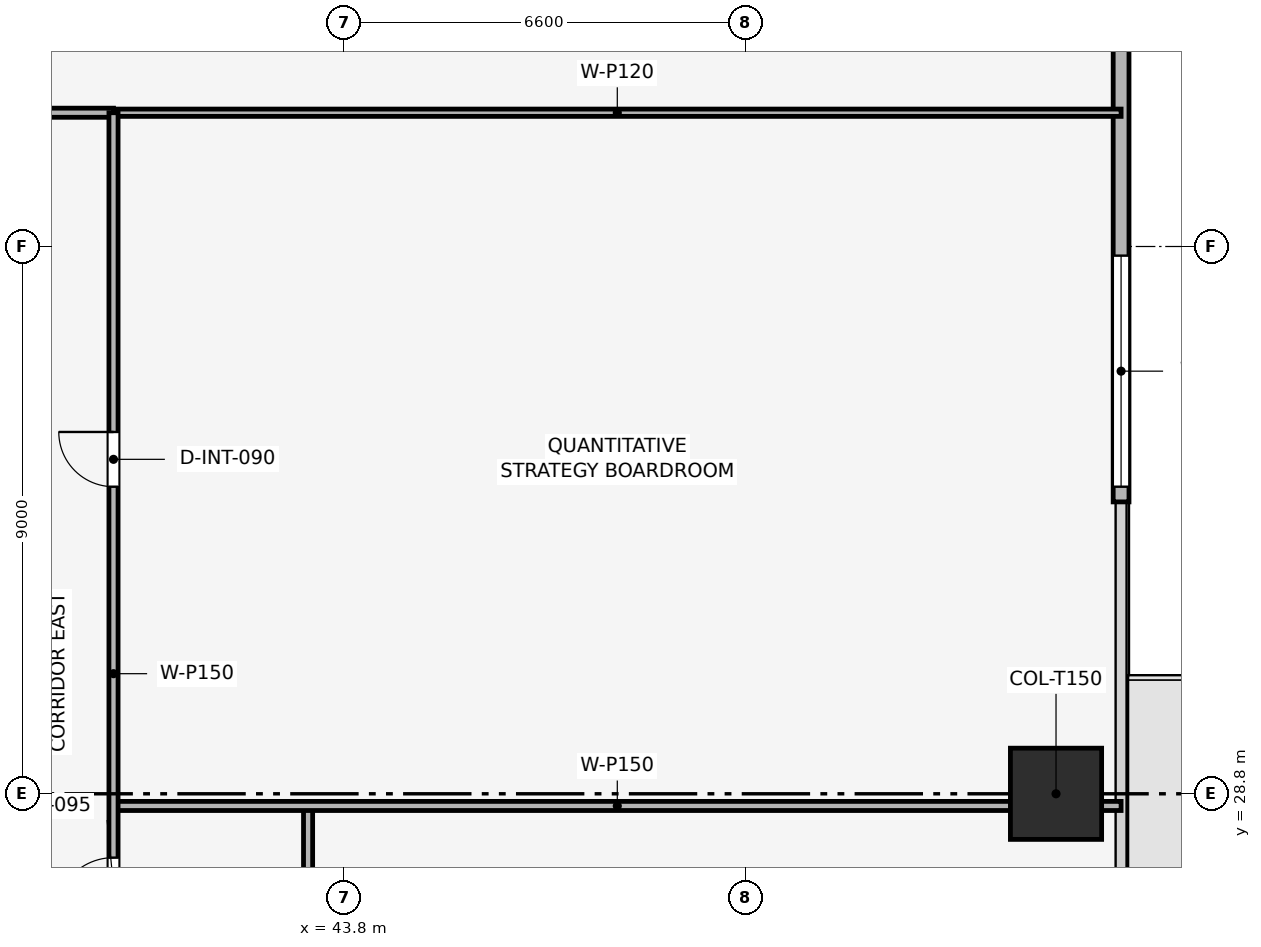
"""IFC4 building model, lengths in metres.
Left out: names, types, materials, properties, quantities, classifications, styles, units other than length and angle.
Written with IfcOpenShell. Run it as: python <this file> out.ifc"""

import sys

from ifc_helpers import new_model, si_unit, direction, frame, frame_2d, origin, origin_2d, place, context, subcontext, project, spatial, rectangle, extrude, element, fill, save


model = new_model("IFC4")
c1 = context("Model", 3, precision=1e-05, world=origin(), true_north=direction((0.0, 1.0)))
c2 = subcontext(c1, "Body", "Model", "MODEL_VIEW")
j1 = project(units=[si_unit("LENGTHUNIT", "METRE"), si_unit("PLANEANGLEUNIT", "RADIAN")], contexts=[c1])
p1 = place(None, origin())
s1 = spatial("IfcSite", under=j1, at=p1, CompositionType="ELEMENT")
p2 = place(p1, origin())
s2 = spatial("IfcBuilding", under=s1, at=p2, CompositionType="ELEMENT")
p3 = place(p2, frame((0.0, 0.0, 88.5)))
s3 = spatial("IfcBuildingStorey", under=s2, at=p3, CompositionType="ELEMENT", Elevation=88.5)
p4 = place(p3, frame((55.5, 28.8, 0.003), z_axis=(0.0, 0.0, 1.0), x_axis=(1.0, 0.0, 0.0)))
e1 = element("IfcColumn", 1, at=p4, inside=s3, PredefinedType="COLUMN", context=c2, shape_type="SweptSolid", body=[
    extrude(rectangle(XDim=1.5, YDim=1.5, at=origin_2d()), origin(), (0.0, 0.0, 1.0), 3.644),
])
p5 = place(p3, frame((56.57, 48.9, 0.0), z_axis=(0.0, 0.0, 1.0), x_axis=(0.0, -1.0, 0.0)))
e2 = element("IfcWall", 2, at=p5, inside=s3, PredefinedType="SOLIDWALL", context=c2, shape_type="SweptSolid", body=[
    extrude(rectangle(XDim=15.3, YDim=0.26, at=frame_2d((7.65, 0.0))), origin(), (0.0, 0.0, 1.0), 3.65),
])
p6 = place(p5, frame((11.25, 0.0, 0.9)))
e3 = element("IfcOpeningElement", 3, at=p6, cuts=e2, PredefinedType="OPENING", context=c2, shape_type="SweptSolid", body=[
    extrude(rectangle(XDim=3.8, YDim=1.9, at=frame_2d((1.9, 0.95))), frame((0.0, 0.14, 0.0), z_axis=(0.0, -1.0, 0.0), x_axis=(1.0, 0.0, 0.0)), (0.0, 0.0, 1.0), 0.28),
])
p7 = place(p3, frame((40.0, 40.0, 0.0), z_axis=(0.0, 0.0, 1.0), x_axis=(1.0, 0.0, 0.0)))
e4 = element("IfcWall", 4, at=p7, inside=s3, PredefinedType="PARTITIONING", context=c2, shape_type="SweptSolid", body=[
    extrude(rectangle(XDim=16.57, YDim=0.12, at=frame_2d((8.285, 0.0))), origin(), (0.0, 0.0, 1.0), 2.935),
])
p8 = place(p3, frame((43.2, 20.2, 0.0), z_axis=(0.0, 0.0, 1.0), x_axis=(0.0, 1.0, 0.0)))
e5 = element("IfcWall", 5, at=p8, inside=s3, PredefinedType="PARTITIONING", context=c2, shape_type="SweptSolid", body=[
    extrude(rectangle(XDim=8.4, YDim=0.15, at=frame_2d((4.2, 0.0))), origin(), (0.0, 0.0, 1.0), 3.085),
])
p9 = place(p3, frame((40.0, 28.6, 0.0), z_axis=(0.0, 0.0, 1.0), x_axis=(1.0, 0.0, 0.0)))
e6 = element("IfcWall", 6, at=p9, inside=s3, PredefinedType="PARTITIONING", context=c2, shape_type="SweptSolid", body=[
    extrude(rectangle(XDim=16.57, YDim=0.15, at=frame_2d((8.285, 0.0))), origin(), (0.0, 0.0, 1.0), 2.935),
])
p10 = place(p3, frame((17.6, 40.0, 0.0), z_axis=(0.0, 0.0, 1.0), x_axis=(1.0, 0.0, 0.0)))
e7 = element("IfcWall", 7, at=p10, inside=s3, PredefinedType="PARTITIONING", context=c2, shape_type="SweptSolid", body=[
    extrude(rectangle(XDim=22.4, YDim=0.15, at=frame_2d((11.2, 0.0))), origin(), (0.0, 0.0, 1.0), 3.085),
])
p11 = place(p10, frame((0.7, 0.0, 0.0)))
e8 = element("IfcOpeningElement", 8, at=p11, cuts=e7, PredefinedType="OPENING", context=c2, shape_type="SweptSolid", body=[
    extrude(rectangle(XDim=0.9, YDim=2.1, at=frame_2d((0.45, 1.05))), frame((0.0, 0.085, 0.0), z_axis=(0.0, -1.0, 0.0), x_axis=(1.0, 0.0, 0.0)), (0.0, 0.0, 1.0), 0.17),
])
p12 = place(p10, frame((4.888, 0.0, 0.0)))
e9 = element("IfcOpeningElement", 9, at=p12, cuts=e7, PredefinedType="OPENING", context=c2, shape_type="SweptSolid", body=[
    extrude(rectangle(XDim=0.9, YDim=2.1, at=frame_2d((0.45, 1.05))), frame((0.0, 0.085, 0.0), z_axis=(0.0, -1.0, 0.0), x_axis=(1.0, 0.0, 0.0)), (0.0, 0.0, 1.0), 0.17),
])
p13 = place(p10, frame((10.808, 0.0, 0.0)))
e10 = element("IfcOpeningElement", 10, at=p13, cuts=e7, PredefinedType="OPENING", context=c2, shape_type="SweptSolid", body=[
    extrude(rectangle(XDim=0.9, YDim=2.1, at=frame_2d((0.45, 1.05))), frame((0.0, 0.085, 0.0), z_axis=(0.0, -1.0, 0.0), x_axis=(1.0, 0.0, 0.0)), (0.0, 0.0, 1.0), 0.17),
])
p14 = place(p10, frame((17.82, 0.0, 0.0)))
e11 = element("IfcOpeningElement", 11, at=p14, cuts=e7, PredefinedType="OPENING", context=c2, shape_type="SweptSolid", body=[
    extrude(rectangle(XDim=0.9, YDim=2.1, at=frame_2d((0.45, 1.05))), frame((0.0, 0.085, 0.0), z_axis=(0.0, -1.0, 0.0), x_axis=(1.0, 0.0, 0.0)), (0.0, 0.0, 1.0), 0.17),
])
p15 = place(p3, frame((40.0, 17.6, 0.0), z_axis=(0.0, 0.0, 1.0), x_axis=(0.0, 1.0, 0.0)))
e12 = element("IfcWall", 12, at=p15, inside=s3, PredefinedType="PARTITIONING", context=c2, shape_type="SweptSolid", body=[
    extrude(rectangle(XDim=22.4, YDim=0.15, at=frame_2d((11.2, 0.0))), origin(), (0.0, 0.0, 1.0), 3.085),
])
p16 = place(p15, frame((0.85, 0.0, 0.0)))
e13 = element("IfcOpeningElement", 13, at=p16, cuts=e12, PredefinedType="OPENING", context=c2, shape_type="SweptSolid", body=[
    extrude(rectangle(XDim=0.9, YDim=2.1, at=frame_2d((0.45, 1.05))), frame((0.0, 0.085, 0.0), z_axis=(0.0, -1.0, 0.0), x_axis=(1.0, 0.0, 0.0)), (0.0, 0.0, 1.0), 0.17),
])
p17 = place(p15, frame((3.55, 0.0, 0.0)))
e14 = element("IfcOpeningElement", 14, at=p17, cuts=e12, PredefinedType="OPENING", context=c2, shape_type="SweptSolid", body=[
    extrude(rectangle(XDim=0.9, YDim=2.1, at=frame_2d((0.45, 1.05))), frame((0.0, 0.085, 0.0), z_axis=(0.0, -1.0, 0.0), x_axis=(1.0, 0.0, 0.0)), (0.0, 0.0, 1.0), 0.17),
])
p18 = place(p15, frame((6.45, 0.0, 0.0)))
e15 = element("IfcOpeningElement", 15, at=p18, cuts=e12, PredefinedType="OPENING", context=c2, shape_type="SweptSolid", body=[
    extrude(rectangle(XDim=0.9, YDim=2.1, at=frame_2d((0.45, 1.05))), frame((0.0, 0.085, 0.0), z_axis=(0.0, -1.0, 0.0), x_axis=(1.0, 0.0, 0.0)), (0.0, 0.0, 1.0), 0.17),
])
p19 = place(p15, frame((9.2, 0.0, 0.0)))
e16 = element("IfcOpeningElement", 16, at=p19, cuts=e12, PredefinedType="OPENING", context=c2, shape_type="SweptSolid", body=[
    extrude(rectangle(XDim=0.95, YDim=2.1, at=frame_2d((0.475, 1.05))), frame((0.0, 0.085, 0.0), z_axis=(0.0, -1.0, 0.0), x_axis=(1.0, 0.0, 0.0)), (0.0, 0.0, 1.0), 0.17),
])
p20 = place(p15, frame((16.25, 0.0, 0.0)))
e17 = element("IfcOpeningElement", 17, at=p20, cuts=e12, PredefinedType="OPENING", context=c2, shape_type="SweptSolid", body=[
    extrude(rectangle(XDim=0.9, YDim=2.1, at=frame_2d((0.45, 1.05))), frame((0.0, 0.085, 0.0), z_axis=(0.0, -1.0, 0.0), x_axis=(1.0, 0.0, 0.0)), (0.0, 0.0, 1.0), 0.17),
])
p21 = place(p6, origin())
e18 = element("IfcWindow", 18, at=p21, inside=s3, PartitioningType="SINGLE_PANEL", PredefinedType="WINDOW", context=c2, shape_type="SweptSolid", body=[
    extrude(rectangle(XDim=3.8, YDim=1.9, at=frame_2d((1.9, 0.95))), frame((0.0, 0.03, 0.0), z_axis=(0.0, -1.0, 0.0), x_axis=(1.0, 0.0, 0.0)), (0.0, 0.0, 1.0), 0.06),
])
fill(e3, e18)
p22 = place(p19, origin())
e19 = element("IfcDoor", 19, at=p22, inside=s3, OperationType="SINGLE_SWING_LEFT", PredefinedType="DOOR", context=c2, shape_type="SweptSolid", body=[
    extrude(rectangle(XDim=0.95, YDim=2.1, at=frame_2d((0.475, 1.05))), frame((0.0, 0.025, 0.0), z_axis=(0.0, -1.0, 0.0), x_axis=(1.0, 0.0, 0.0)), (0.0, 0.0, 1.0), 0.05),
])
fill(e16, e19)
p23 = place(p20, origin())
e20 = element("IfcDoor", 20, at=p23, inside=s3, OperationType="SINGLE_SWING_RIGHT", PredefinedType="DOOR", context=c2, shape_type="SweptSolid", body=[
    extrude(rectangle(XDim=0.9, YDim=2.1, at=frame_2d((0.45, 1.05))), frame((0.0, 0.025, 0.0), z_axis=(0.0, -1.0, 0.0), x_axis=(1.0, 0.0, 0.0)), (0.0, 0.0, 1.0), 0.05),
])
fill(e17, e20)
save(model, sys.argv[1])
